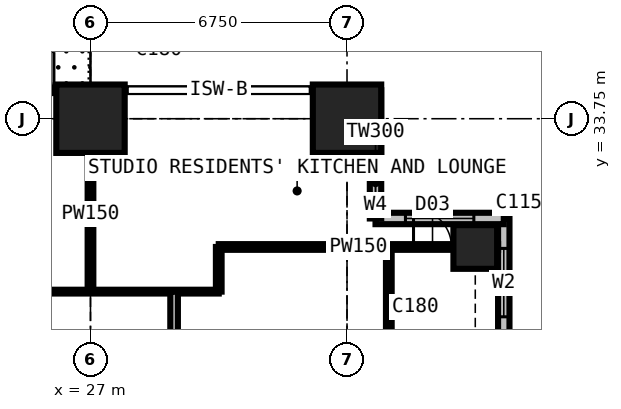
"""IFC4 building model, lengths in metres.
Left out: names, types, materials, properties, quantities, classifications, styles, units other than length and angle.
Written with IfcOpenShell. Run it as: python <this file> out.ifc"""

import sys

from ifc_helpers import new_model, si_unit, direction, frame, frame_2d, origin, origin_2d, place, context, subcontext, project, spatial, rectangle, extrude, element, fill, save


model = new_model("IFC4")
c1 = context("Model", 3, precision=1e-05, world=origin(), true_north=direction((0.0, 1.0)))
c2 = subcontext(c1, "Body", "Model", "MODEL_VIEW")
j1 = project(units=[si_unit("LENGTHUNIT", "METRE"), si_unit("PLANEANGLEUNIT", "RADIAN")], contexts=[c1])
p1 = place(None, origin())
s1 = spatial("IfcSite", under=j1, at=p1, CompositionType="ELEMENT")
p2 = place(p1, origin())
s2 = spatial("IfcBuilding", under=s1, at=p2, CompositionType="ELEMENT")
p3 = place(p2, frame((0.0, 0.0, 105.3)))
s3 = spatial("IfcBuildingStorey", under=s2, at=p3, CompositionType="ELEMENT", Elevation=105.3)
for number, where, z_axis, x_axis in (
    (1, (27.0, 33.75, 0.0), (0.0, 0.0, 1.0), (1.0, 0.0, 0.0)),
    (2, (33.75, 33.75, 0.0), (0.0, 0.0, 1.0), (1.0, 0.0, 0.0)),
):
    element("IfcColumn", number, at=place(p3, frame(where, z_axis=z_axis, x_axis=x_axis)), inside=s3, PredefinedType="COLUMN", context=c2, shape_type="SweptSolid", body=[
        extrude(rectangle(XDim=1.8, YDim=1.8, at=origin_2d()), origin(), (0.0, 0.0, 1.0), 3.6),
    ])
p4 = place(p3, frame((37.125, 30.375, 0.0), z_axis=(0.0, 0.0, 1.0), x_axis=(1.0, 0.0, 0.0)))
e3 = element("IfcColumn", 3, at=p4, inside=s3, PredefinedType="COLUMN", context=c2, shape_type="SweptSolid", body=[
    extrude(rectangle(XDim=1.15, YDim=1.15, at=origin_2d()), origin(), (0.0, 0.0, 1.0), 3.6),
])
p5 = place(p3, frame((37.875, 27.75, 0.0), z_axis=(0.0, 0.0, 1.0), x_axis=(0.0, 1.0, 0.0)))
e4 = element("IfcWall", 4, at=p5, inside=s3, PredefinedType="SOLIDWALL", context=c2, shape_type="SweptSolid", body=[
    extrude(rectangle(XDim=3.375, YDim=0.3, at=frame_2d((1.688, 0.0))), origin(), (0.0, 0.0, 1.0), 3.375),
])
p6 = place(p5, frame((0.788, 0.0, 0.6)))
e5 = element("IfcOpeningElement", 5, at=p6, cuts=e4, PredefinedType="OPENING", context=c2, shape_type="SweptSolid", body=[
    extrude(rectangle(XDim=1.8, YDim=2.1, at=frame_2d((0.9, 1.05))), frame((0.0, 0.16, 0.0), z_axis=(0.0, -1.0, 0.0), x_axis=(1.0, 0.0, 0.0)), (0.0, 0.0, 1.0), 0.32),
])
p7 = place(p3, frame((37.875, 31.125, 0.0), z_axis=(0.0, 0.0, 1.0), x_axis=(-1.0, 0.0, 0.0)))
e6 = element("IfcWall", 6, at=p7, inside=s3, PredefinedType="SOLIDWALL", context=c2, shape_type="SweptSolid", body=[
    extrude(rectangle(XDim=3.375, YDim=0.3, at=frame_2d((1.688, 0.0))), origin(), (0.0, 0.0, 1.0), 3.375),
])
p8 = place(p7, frame((0.788, 0.0, 0.6)))
e7 = element("IfcOpeningElement", 7, at=p8, cuts=e6, PredefinedType="OPENING", context=c2, shape_type="SweptSolid", body=[
    extrude(rectangle(XDim=1.8, YDim=2.1, at=frame_2d((0.9, 1.05))), frame((0.0, 0.16, 0.0), z_axis=(0.0, -1.0, 0.0), x_axis=(1.0, 0.0, 0.0)), (0.0, 0.0, 1.0), 0.32),
])
p9 = place(p3, frame((34.5, 31.125, 0.0), z_axis=(0.0, 0.0, 1.0), x_axis=(0.0, 1.0, 0.0)))
e8 = element("IfcWall", 8, at=p9, inside=s3, PredefinedType="SOLIDWALL", context=c2, shape_type="SweptSolid", body=[
    extrude(rectangle(XDim=3.375, YDim=0.3, at=frame_2d((1.688, 0.0))), origin(), (0.0, 0.0, 1.0), 3.375),
])
p10 = place(p9, frame((0.343, 0.0, 0.9)))
e9 = element("IfcOpeningElement", 9, at=p10, cuts=e8, PredefinedType="OPENING", context=c2, shape_type="SweptSolid", body=[
    extrude(rectangle(XDim=1.2, YDim=1.8, at=frame_2d((0.6, 0.9))), frame((0.0, 0.16, 0.0), z_axis=(0.0, -1.0, 0.0), x_axis=(1.0, 0.0, 0.0)), (0.0, 0.0, 1.0), 0.32),
])
p11 = place(p3, frame((20.25, 34.5, 0.0), z_axis=(0.0, 0.0, 1.0), x_axis=(1.0, 0.0, 0.0)))
e10 = element("IfcWall", 10, at=p11, inside=s3, PredefinedType="SOLIDWALL", context=c2, shape_type="SweptSolid", body=[
    extrude(rectangle(XDim=6.75, YDim=0.15, at=frame_2d((3.375, 0.0))), origin(), (0.0, 0.0, 1.0), 3.375),
])
p12 = place(p11, frame((0.962, 0.0, 0.0)))
e11 = element("IfcOpeningElement", 11, at=p12, cuts=e10, PredefinedType="OPENING", context=c2, shape_type="SweptSolid", body=[
    extrude(rectangle(XDim=1.0, YDim=2.2, at=frame_2d((0.5, 1.1))), frame((0.0, 0.085, 0.0), z_axis=(0.0, -1.0, 0.0), x_axis=(1.0, 0.0, 0.0)), (0.0, 0.0, 1.0), 0.17),
])
p13 = place(p11, frame((2.025, 0.0, 0.9)))
e12 = element("IfcOpeningElement", 12, at=p13, cuts=e10, PredefinedType="OPENING", context=c2, shape_type="SweptSolid", body=[
    extrude(rectangle(XDim=1.2, YDim=1.8, at=frame_2d((0.6, 0.9))), frame((0.0, 0.085, 0.0), z_axis=(0.0, -1.0, 0.0), x_axis=(1.0, 0.0, 0.0)), (0.0, 0.0, 1.0), 0.17),
])
p14 = place(p11, frame((4.788, 0.0, 0.0)))
e13 = element("IfcOpeningElement", 13, at=p14, cuts=e10, PredefinedType="OPENING", context=c2, shape_type="SweptSolid", body=[
    extrude(rectangle(XDim=1.0, YDim=2.2, at=frame_2d((0.5, 1.1))), frame((0.0, 0.085, 0.0), z_axis=(0.0, -1.0, 0.0), x_axis=(1.0, 0.0, 0.0)), (0.0, 0.0, 1.0), 0.17),
])
p15 = place(p11, frame((3.525, 0.0, 0.9)))
e14 = element("IfcOpeningElement", 14, at=p15, cuts=e10, PredefinedType="OPENING", context=c2, shape_type="SweptSolid", body=[
    extrude(rectangle(XDim=1.2, YDim=1.8, at=frame_2d((0.6, 0.9))), frame((0.0, 0.085, 0.0), z_axis=(0.0, -1.0, 0.0), x_axis=(1.0, 0.0, 0.0)), (0.0, 0.0, 1.0), 0.17),
])
p16 = place(p3, frame((11.3, 29.2, 0.0), z_axis=(0.0, 0.0, 1.0), x_axis=(1.0, 0.0, 0.0)))
e15 = element("IfcWall", 15, at=p16, inside=s3, PredefinedType="PARTITIONING", context=c2, shape_type="SweptSolid", body=[
    extrude(rectangle(XDim=19.075, YDim=0.1, at=frame_2d((9.538, 0.0))), origin(), (0.0, 0.0, 1.0), 3.375),
])
p17 = place(p16, frame((6.4, 0.0, 0.0)))
e16 = element("IfcOpeningElement", 16, at=p17, cuts=e15, PredefinedType="OPENING", context=c2, shape_type="SweptSolid", body=[
    extrude(rectangle(XDim=0.95, YDim=2.2, at=frame_2d((0.475, 1.1))), frame((0.0, 0.06, 0.0), z_axis=(0.0, -1.0, 0.0), x_axis=(1.0, 0.0, 0.0)), (0.0, 0.0, 1.0), 0.12),
])
p18 = place(p16, frame((13.15, 0.0, 0.0)))
e17 = element("IfcOpeningElement", 17, at=p18, cuts=e15, PredefinedType="OPENING", context=c2, shape_type="SweptSolid", body=[
    extrude(rectangle(XDim=0.95, YDim=2.2, at=frame_2d((0.475, 1.1))), frame((0.0, 0.06, 0.0), z_axis=(0.0, -1.0, 0.0), x_axis=(1.0, 0.0, 0.0)), (0.0, 0.0, 1.0), 0.12),
])
p19 = place(p16, frame((0.6, 0.0, 0.0)))
e18 = element("IfcOpeningElement", 18, at=p19, cuts=e15, PredefinedType="OPENING", context=c2, shape_type="SweptSolid", body=[
    extrude(rectangle(XDim=1.0, YDim=2.2, at=frame_2d((0.5, 1.1))), frame((0.0, 0.06, 0.0), z_axis=(0.0, -1.0, 0.0), x_axis=(1.0, 0.0, 0.0)), (0.0, 0.0, 1.0), 0.12),
])
p20 = place(p3, frame((27.0, 29.2, 0.0), z_axis=(0.0, 0.0, 1.0), x_axis=(0.0, 1.0, 0.0)))
e19 = element("IfcWall", 19, at=p20, inside=s3, PredefinedType="PARTITIONING", context=c2, shape_type="SweptSolid", body=[
    extrude(rectangle(XDim=5.284, YDim=0.15, at=frame_2d((2.642, 0.0))), origin(), (0.0, 0.0, 1.0), 2.61),
])
p21 = place(p3, frame((29.2, 11.3, 0.0), z_axis=(0.0, 0.0, 1.0), x_axis=(0.0, 1.0, 0.0)))
e20 = element("IfcWall", 20, at=p21, inside=s3, PredefinedType="PARTITIONING", context=c2, shape_type="SweptSolid", body=[
    extrude(rectangle(XDim=17.9, YDim=0.2, at=frame_2d((8.95, 0.0))), origin(), (0.0, 0.0, 1.0), 3.375),
])
p22 = place(p21, frame((8.35, 0.0, 0.0)))
e21 = element("IfcOpeningElement", 21, at=p22, cuts=e20, PredefinedType="OPENING", context=c2, shape_type="SweptSolid", body=[
    extrude(rectangle(XDim=1.2, YDim=2.2, at=frame_2d((0.6, 1.1))), frame((0.0, 0.11, 0.0), z_axis=(0.0, -1.0, 0.0), x_axis=(1.0, 0.0, 0.0)), (0.0, 0.0, 1.0), 0.22),
])
p23 = place(p3, frame((30.375, 29.2, 0.0), z_axis=(0.0, 0.0, 1.0), x_axis=(0.0, 1.0, 0.0)))
e22 = element("IfcWall", 22, at=p23, inside=s3, PredefinedType="PARTITIONING", context=c2, shape_type="SweptSolid", body=[
    extrude(rectangle(XDim=1.175, YDim=0.15, at=frame_2d((0.587, 0.0))), origin(), (0.0, 0.0, 1.0), 3.375),
])
p24 = place(p3, frame((30.375, 30.375, 0.0), z_axis=(0.0, 0.0, 1.0), x_axis=(1.0, 0.0, 0.0)))
e23 = element("IfcWall", 23, at=p24, inside=s3, PredefinedType="PARTITIONING", context=c2, shape_type="SweptSolid", body=[
    extrude(rectangle(XDim=7.35, YDim=0.15, at=frame_2d((3.675, 0.0))), origin(), (0.0, 0.0, 1.0), 2.877),
])
p25 = place(p24, frame((5.125, 0.0, 0.0)))
e24 = element("IfcOpeningElement", 24, at=p25, cuts=e23, PredefinedType="OPENING", context=c2, shape_type="SweptSolid", body=[
    extrude(rectangle(XDim=1.0, YDim=2.2, at=frame_2d((0.5, 1.1))), frame((0.0, 0.085, 0.0), z_axis=(0.0, -1.0, 0.0), x_axis=(1.0, 0.0, 0.0)), (0.0, 0.0, 1.0), 0.17),
])
p26 = place(p3, frame((34.85, 12.55, 0.0), z_axis=(0.0, 0.0, 1.0), x_axis=(0.0, 1.0, 0.0)))
e25 = element("IfcWall", 25, at=p26, inside=s3, PredefinedType="PARTITIONING", context=c2, shape_type="SweptSolid", body=[
    extrude(rectangle(XDim=17.825, YDim=0.15, at=frame_2d((8.913, 0.0))), origin(), (0.0, 0.0, 1.0), 3.375),
])
p27 = place(p26, frame((8.6, 0.0, 0.0)))
e26 = element("IfcOpeningElement", 26, at=p27, cuts=e25, PredefinedType="OPENING", context=c2, shape_type="SweptSolid", body=[
    extrude(rectangle(XDim=0.95, YDim=2.2, at=frame_2d((0.475, 1.1))), frame((0.0, 0.085, 0.0), z_axis=(0.0, -1.0, 0.0), x_axis=(1.0, 0.0, 0.0)), (0.0, 0.0, 1.0), 0.17),
])
p28 = place(p6, origin())
e27 = element("IfcWindow", 27, at=p28, inside=s3, PartitioningType="SINGLE_PANEL", PredefinedType="WINDOW", context=c2, shape_type="SweptSolid", body=[
    extrude(rectangle(XDim=1.8, YDim=2.1, at=frame_2d((0.9, 1.05))), frame((0.0, 0.03, 0.0), z_axis=(0.0, -1.0, 0.0), x_axis=(1.0, 0.0, 0.0)), (0.0, 0.0, 1.0), 0.06),
])
fill(e5, e27)
p29 = place(p8, origin())
e28 = element("IfcWindow", 28, at=p29, inside=s3, PartitioningType="SINGLE_PANEL", PredefinedType="WINDOW", context=c2, shape_type="SweptSolid", body=[
    extrude(rectangle(XDim=1.8, YDim=2.1, at=frame_2d((0.9, 1.05))), frame((0.0, 0.03, 0.0), z_axis=(0.0, -1.0, 0.0), x_axis=(1.0, 0.0, 0.0)), (0.0, 0.0, 1.0), 0.06),
])
fill(e7, e28)
p30 = place(p10, origin())
e29 = element("IfcWindow", 29, at=p30, inside=s3, PartitioningType="SINGLE_PANEL", PredefinedType="WINDOW", context=c2, shape_type="SweptSolid", body=[
    extrude(rectangle(XDim=1.2, YDim=1.8, at=frame_2d((0.6, 0.9))), frame((0.0, 0.03, 0.0), z_axis=(0.0, -1.0, 0.0), x_axis=(1.0, 0.0, 0.0)), (0.0, 0.0, 1.0), 0.06),
])
fill(e9, e29)
p31 = place(p14, origin())
e30 = element("IfcDoor", 30, at=p31, inside=s3, OperationType="SINGLE_SWING_RIGHT", PredefinedType="DOOR", context=c2, shape_type="SweptSolid", body=[
    extrude(rectangle(XDim=1.0, YDim=2.2, at=frame_2d((0.5, 1.1))), frame((0.0, 0.025, 0.0), z_axis=(0.0, -1.0, 0.0), x_axis=(1.0, 0.0, 0.0)), (0.0, 0.0, 1.0), 0.05),
])
fill(e13, e30)
p32 = place(p25, origin())
e31 = element("IfcDoor", 31, at=p32, inside=s3, OperationType="SINGLE_SWING_LEFT", PredefinedType="DOOR", context=c2, shape_type="SweptSolid", body=[
    extrude(rectangle(XDim=1.0, YDim=2.2, at=frame_2d((0.5, 1.1))), frame((0.0, 0.025, 0.0), z_axis=(0.0, -1.0, 0.0), x_axis=(1.0, 0.0, 0.0)), (0.0, 0.0, 1.0), 0.05),
])
fill(e24, e31)
save(model, sys.argv[1])
